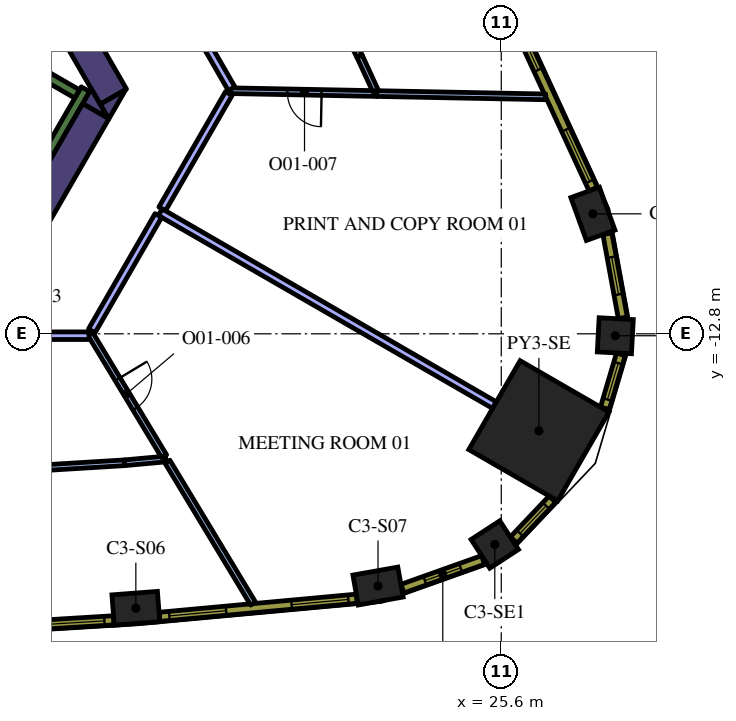
"""IFC4 building model, lengths in metres.
Left out: names, types, materials, properties, quantities, classifications, styles, units other than length and angle.
Written with IfcOpenShell. Run it as: python <this file> out.ifc"""

import sys

from ifc_helpers import new_model, si_unit, direction, frame, frame_2d, origin, origin_2d, place, context, subcontext, project, spatial, polyline, rectangle, outline, extrude, element, fill, save


model = new_model("IFC4")
c1 = context("Model", 3, precision=1e-05, world=origin(), true_north=direction((0.0, 1.0)))
c2 = subcontext(c1, "Body", "Model", "MODEL_VIEW")
j1 = project(units=[si_unit("LENGTHUNIT", "METRE"), si_unit("PLANEANGLEUNIT", "RADIAN")], contexts=[c1])
p1 = place(None, origin())
s1 = spatial("IfcSite", under=j1, at=p1, CompositionType="ELEMENT")
p2 = place(p1, origin())
s2 = spatial("IfcBuilding", under=s1, at=p2, CompositionType="ELEMENT")
p3 = place(p2, frame((0.0, 0.0, 150.0)))
s3 = spatial("IfcBuildingStorey", under=s2, at=p3, CompositionType="ELEMENT", Elevation=150.0)
p4 = place(p3, frame((26.591, -15.352, 0.0), z_axis=(0.0, 0.0, 1.0), x_axis=(0.866025403784, -0.5, 0.0)))
e1 = element("IfcColumn", 1, at=p4, inside=s3, PredefinedType="COLUMN", context=c2, shape_type="SweptSolid", body=[
    extrude(rectangle(XDim=2.7, YDim=2.7, at=origin_2d()), origin(), (0.0, 0.0, 1.0), 4.2),
])
for number, where, z_axis, x_axis in (
    (2, (15.985, -20.022, 0.0), (0.0, 0.0, 1.0), (0.997, 0.076, 0.0)),
    (3, (22.357, -19.437, 0.0), (0.0, 0.0, 1.0), (0.985, 0.175, 0.0)),
):
    element("IfcColumn", number, at=place(p3, frame(where, z_axis=z_axis, x_axis=x_axis)), inside=s3, PredefinedType="COLUMN", context=c2, shape_type="SweptSolid", body=[
        extrude(rectangle(XDim=1.2, YDim=0.8, at=origin_2d()), origin(), (0.0, 0.0, 1.0), 4.2),
    ])
for number, where, z_axis, x_axis in (
    (4, (25.43, -18.344, 0.0), (0.0, 0.0, 1.0), (0.838, 0.546, 0.0)),
    (5, (28.601, -12.851, 0.0), (0.0, 0.0, 1.0), (0.053, 0.999, 0.0)),
):
    element("IfcColumn", number, at=place(p3, frame(where, z_axis=z_axis, x_axis=x_axis)), inside=s3, PredefinedType="COLUMN", context=c2, shape_type="SweptSolid", body=[
        extrude(rectangle(XDim=0.9, YDim=0.9, at=origin_2d()), origin(), (0.0, 0.0, 1.0), 4.2),
    ])
p5 = place(p3, frame((28.012, -9.644, 0.0), z_axis=(0.0, 0.0, 1.0), x_axis=(-0.340743851601, 0.940156171918, 0.0)))
e6 = element("IfcColumn", 6, at=p5, inside=s3, PredefinedType="COLUMN", context=c2, shape_type="SweptSolid", body=[
    extrude(rectangle(XDim=1.2, YDim=0.8, at=origin_2d()), origin(), (0.0, 0.0, 1.0), 4.2),
])
p6 = place(p3, frame((9.129, 4.289, 0.0), z_axis=(0.0, 0.0, 1.0), x_axis=(0.499995742806, -0.866027861663, 0.0)))
e7 = element("IfcWall", 7, at=p6, inside=s3, PredefinedType="SOLIDWALL", context=c2, shape_type="SweptSolid", body=[
    extrude(rectangle(XDim=12.527, YDim=0.8, at=frame_2d((6.264, 0.0))), origin(), (0.0, 0.0, 1.0), 4.2),
])
p7 = place(p3, origin())
e8 = element("IfcWall", 8, at=p7, inside=s3, PredefinedType="SOLIDWALL", context=c2, shape_type="SweptSolid", body=[
    extrude(outline(polyline([(15.271, -7.15), (15.047, -6.762), (15.719, -6.374), (15.271, -7.15)])), origin(), (0.0, 0.0, 1.0), 4.2),
])
p8 = place(p3, frame((13.018, -10.252, 0.0), z_axis=(0.0, 0.0, 1.0), x_axis=(0.499984020225, 0.866034629516, 0.0)))
e9 = element("IfcWall", 9, at=p8, inside=s3, PredefinedType="SOLIDWALL", context=c2, shape_type="SweptSolid", body=[
    extrude(rectangle(XDim=3.824, YDim=0.8, at=frame_2d((1.912, 0.0))), origin(), (0.0, 0.0, 1.0), 4.2),
])
e10 = element("IfcWall", 10, at=p7, inside=s3, PredefinedType="SOLIDWALL", context=c2, shape_type="SweptSolid", body=[
    extrude(outline(polyline([(14.809, -6.35), (15.257, -7.126), (14.585, -6.738), (14.809, -6.35)])), origin(), (0.0, 0.0, 1.0), 4.2),
])
p9 = place(p3, frame((12.84, -9.511, 0.0), z_axis=(0.0, 0.0, 1.0), x_axis=(0.499997733992, 0.866026712061, 0.0)))
e11 = element("IfcWall", 11, at=p9, inside=s3, PredefinedType="SOLIDWALL", context=c2, shape_type="SweptSolid", body=[
    extrude(rectangle(XDim=3.634, YDim=0.25, at=frame_2d((1.817, 0.0))), origin(), (0.0, 0.0, 1.0), 4.2),
])
p10 = place(p3, frame((8.334, -2.964, 0.0), z_axis=(0.0, 0.0, 1.0), x_axis=(0.866016039709, -0.500016218704, 0.0)))
e12 = element("IfcWall", 12, at=p10, inside=s3, PredefinedType="SOLIDWALL", context=c2, shape_type="SweptSolid", body=[
    extrude(rectangle(XDim=7.05, YDim=0.25, at=frame_2d((3.525, 0.0))), origin(), (0.0, 0.0, 1.0), 4.2),
])
p11 = place(p3, frame((15.692, -16.193, 0.0), z_axis=(0.0, 0.0, 1.0), x_axis=(-0.998137075468, -0.061011298754, 0.0)))
e13 = element("IfcWall", 13, at=p11, inside=s3, PredefinedType="PARTITIONING", context=c2, shape_type="SweptSolid", body=[
    extrude(rectangle(XDim=6.282, YDim=0.15, at=frame_2d((3.141, 0.0))), origin(), (0.0, 0.0, 1.0), 3.15),
])
p12 = place(p11, frame((2.683, 0.0, 0.0)))
e14 = element("IfcOpeningElement", 14, at=p12, cuts=e13, PredefinedType="OPENING", context=c2, shape_type="SweptSolid", body=[
    extrude(rectangle(XDim=0.9, YDim=2.1, at=frame_2d((0.45, 1.05))), frame((0.0, 0.085, 0.0), z_axis=(0.0, -1.0, 0.0), x_axis=(1.0, 0.0, 0.0)), (0.0, 0.0, 1.0), 0.17),
])
p13 = place(p3, frame((15.692, -16.193, 0.0), z_axis=(0.0, 0.0, 1.0), x_axis=(0.995822859979, 0.091306251389, 0.0)))
e15 = element("IfcWall", 15, at=p13, inside=s3, PredefinedType="PARTITIONING", context=c2, shape_type="SweptSolid", body=[
    extrude(rectangle(XDim=1.086, YDim=0.15, at=frame_2d((0.543, 0.0))), origin(), (0.0, 0.0, 1.0), 3.15),
])
p14 = place(p3, frame((16.816, -16.165, 0.0), z_axis=(0.0, 0.0, 1.0), x_axis=(0.516814925326, -0.85609715159, 0.0)))
e16 = element("IfcWall", 16, at=p14, inside=s3, PredefinedType="PARTITIONING", context=c2, shape_type="SweptSolid", body=[
    extrude(rectangle(XDim=4.362, YDim=0.15, at=frame_2d((2.181, 0.0))), origin(), (0.0, 0.0, 1.0), 3.15),
])
p15 = place(p3, frame((14.782, -12.796, 0.0), z_axis=(0.0, 0.0, 1.0), x_axis=(0.516809076879, -0.856100682196, 0.0)))
e17 = element("IfcWall", 17, at=p15, inside=s3, PredefinedType="PARTITIONING", context=c2, shape_type="SweptSolid", body=[
    extrude(rectangle(XDim=3.768, YDim=0.15, at=frame_2d((1.884, 0.0))), origin(), (0.0, 0.0, 1.0), 3.15),
])
p16 = place(p15, frame((1.4, 0.0, 0.0)))
e18 = element("IfcOpeningElement", 18, at=p16, cuts=e17, PredefinedType="OPENING", context=c2, shape_type="SweptSolid", body=[
    extrude(rectangle(XDim=0.9, YDim=2.1, at=frame_2d((0.45, 1.05))), frame((0.0, 0.085, 0.0), z_axis=(0.0, -1.0, 0.0), x_axis=(1.0, 0.0, 0.0)), (0.0, 0.0, 1.0), 0.17),
])
p17 = place(p3, frame((5.03, -12.85, 0.0), z_axis=(0.0, 0.0, 1.0), x_axis=(1.0, 0.0, 0.0)))
e19 = element("IfcWall", 19, at=p17, inside=s3, PredefinedType="PARTITIONING", context=c2, shape_type="SweptSolid", body=[
    extrude(rectangle(XDim=9.721, YDim=0.2, at=frame_2d((4.861, 0.0))), origin(), (0.0, 0.0, 1.0), 3.15),
])
p18 = place(p3, frame((16.628, -9.6, 0.0), z_axis=(0.0, 0.0, 1.0), x_axis=(0.866031435434, -0.499989552732, 0.0)))
e20 = element("IfcWall", 20, at=p18, inside=s3, PredefinedType="PARTITIONING", context=c2, shape_type="SweptSolid", body=[
    extrude(rectangle(XDim=10.154, YDim=0.2, at=frame_2d((5.077, 0.0))), origin(), (0.0, 0.0, 1.0), 3.15),
])
p19 = place(p3, frame((14.825, -12.722, 0.0), z_axis=(0.0, 0.0, 1.0), x_axis=(0.499981686864, 0.86603597662, 0.0)))
e21 = element("IfcWall", 21, at=p19, inside=s3, PredefinedType="PARTITIONING", context=c2, shape_type="SweptSolid", body=[
    extrude(rectangle(XDim=3.506, YDim=0.2, at=frame_2d((1.753, 0.0))), origin(), (0.0, 0.0, 1.0), 3.15),
])
p20 = place(p3, frame((22.32, -6.479, 0.0), z_axis=(0.0, 0.0, 1.0), x_axis=(0.999809252738, -0.019530953357, 0.0)))
e22 = element("IfcWall", 22, at=p20, inside=s3, PredefinedType="PARTITIONING", context=c2, shape_type="SweptSolid", body=[
    extrude(rectangle(XDim=4.45, YDim=0.15, at=frame_2d((2.225, 0.0))), origin(), (0.0, 0.0, 1.0), 3.15),
])
p21 = place(p3, frame((22.328, -6.479, 0.0), z_axis=(0.0, 0.0, 1.0), x_axis=(-0.999809811932, 0.019502306655, 0.0)))
e23 = element("IfcWall", 23, at=p21, inside=s3, PredefinedType="PARTITIONING", context=c2, shape_type="SweptSolid", body=[
    extrude(rectangle(XDim=3.856, YDim=0.15, at=frame_2d((1.928, 0.0))), origin(), (0.0, 0.0, 1.0), 3.15),
])
p22 = place(p21, frame((1.456, 0.0, 0.0)))
e24 = element("IfcOpeningElement", 24, at=p22, cuts=e23, PredefinedType="OPENING", context=c2, shape_type="SweptSolid", body=[
    extrude(rectangle(XDim=0.9, YDim=2.1, at=frame_2d((0.45, 1.05))), frame((0.0, 0.085, 0.0), z_axis=(0.0, -1.0, 0.0), x_axis=(1.0, 0.0, 0.0)), (0.0, 0.0, 1.0), 0.17),
])
p23 = place(p3, frame((16.678, -9.513, 0.0), z_axis=(0.0, 0.0, 1.0), x_axis=(0.500011844827, 0.866018565062, 0.0)))
e25 = element("IfcWall", 25, at=p23, inside=s3, PredefinedType="PARTITIONING", context=c2, shape_type="SweptSolid", body=[
    extrude(rectangle(XDim=3.505, YDim=0.2, at=frame_2d((1.753, 0.0))), origin(), (0.0, 0.0, 1.0), 3.15),
])
p24 = place(p3, frame((22.289, -6.403, 0.0), z_axis=(0.0, 0.0, 1.0), x_axis=(-0.41893460807, 0.908016406328, 0.0)))
e26 = element("IfcWall", 26, at=p24, inside=s3, PredefinedType="PARTITIONING", context=c2, shape_type="SweptSolid", body=[
    extrude(rectangle(XDim=1.002, YDim=0.15, at=frame_2d((0.501, 0.0))), origin(), (0.0, 0.0, 1.0), 3.15),
])
p25 = place(p3, frame((19.066, 0.129, 0.0), z_axis=(0.0, 0.0, 1.0), x_axis=(0.446202922071, -0.89493181435, 0.0)))
e27 = element("IfcWall", 27, at=p25, inside=s3, PredefinedType="PARTITIONING", context=c2, shape_type="SweptSolid", body=[
    extrude(rectangle(XDim=6.282, YDim=0.15, at=frame_2d((3.141, 0.0))), origin(), (0.0, 0.0, 1.0), 3.15),
])
p26 = place(p25, frame((2.683, 0.0, 0.0)))
e28 = element("IfcOpeningElement", 28, at=p26, cuts=e27, PredefinedType="OPENING", context=c2, shape_type="SweptSolid", body=[
    extrude(rectangle(XDim=0.9, YDim=2.1, at=frame_2d((0.45, 1.05))), frame((0.0, 0.085, 0.0), z_axis=(0.0, -1.0, 0.0), x_axis=(1.0, 0.0, 0.0)), (0.0, 0.0, 1.0), 0.17),
])
p27 = place(p3, frame((18.504, -6.35, 0.0), z_axis=(0.0, 0.0, 1.0), x_axis=(-0.499995029582, 0.866028273438, 0.0)))
e29 = element("IfcWall", 29, at=p27, inside=s3, PredefinedType="PARTITIONING", context=c2, shape_type="SweptSolid", body=[
    extrude(rectangle(XDim=9.717, YDim=0.2, at=frame_2d((4.859, 0.0))), origin(), (0.0, 0.0, 1.0), 3.15),
])
p28 = place(p3, frame((10.211, -20.656, 0.0), z_axis=(0.0, 0.0, 1.0), x_axis=(0.998135294646, 0.061040425794, 0.0)))
e30 = element("IfcWall", 30, at=p28, inside=s3, PredefinedType="SOLIDWALL", context=c2, shape_type="SweptSolid", body=[
    extrude(rectangle(XDim=5.204, YDim=0.24, at=frame_2d((2.602, 0.0))), origin(), (0.0, 0.0, 1.0), 3.95),
])
p29 = place(p28, frame((0.248, 0.0, 0.9)))
e31 = element("IfcOpeningElement", 31, at=p29, cuts=e30, PredefinedType="OPENING", context=c2, shape_type="SweptSolid", body=[
    extrude(rectangle(XDim=1.5, YDim=2.55, at=frame_2d((0.75, 1.275))), frame((0.0, 0.13, 0.0), z_axis=(0.0, -1.0, 0.0), x_axis=(1.0, 0.0, 0.0)), (0.0, 0.0, 1.0), 0.26),
])
p30 = place(p28, frame((3.455, 0.0, 0.9)))
e32 = element("IfcOpeningElement", 32, at=p30, cuts=e30, PredefinedType="OPENING", context=c2, shape_type="SweptSolid", body=[
    extrude(rectangle(XDim=1.5, YDim=2.55, at=frame_2d((0.75, 1.275))), frame((0.0, 0.13, 0.0), z_axis=(0.0, -1.0, 0.0), x_axis=(1.0, 0.0, 0.0)), (0.0, 0.0, 1.0), 0.26),
])
p31 = place(p3, frame((16.606, -20.247, 0.0), z_axis=(0.0, 0.0, 1.0), x_axis=(0.995808712151, 0.091460422067, 0.0)))
e33 = element("IfcWall", 33, at=p31, inside=s3, PredefinedType="SOLIDWALL", context=c2, shape_type="SweptSolid", body=[
    extrude(rectangle(XDim=5.213, YDim=0.24, at=frame_2d((2.606, 0.0))), origin(), (0.0, 0.0, 1.0), 3.95),
])
p32 = place(p31, frame((0.261, 0.0, 0.9)))
e34 = element("IfcOpeningElement", 34, at=p32, cuts=e33, PredefinedType="OPENING", context=c2, shape_type="SweptSolid", body=[
    extrude(rectangle(XDim=1.5, YDim=2.55, at=frame_2d((0.75, 1.275))), frame((0.0, 0.13, 0.0), z_axis=(0.0, -1.0, 0.0), x_axis=(1.0, 0.0, 0.0)), (0.0, 0.0, 1.0), 0.26),
])
p33 = place(p31, frame((3.492, 0.0, 0.9)))
e35 = element("IfcOpeningElement", 35, at=p33, cuts=e33, PredefinedType="OPENING", context=c2, shape_type="SweptSolid", body=[
    extrude(rectangle(XDim=1.5, YDim=2.55, at=frame_2d((0.75, 1.275))), frame((0.0, 0.13, 0.0), z_axis=(0.0, -1.0, 0.0), x_axis=(1.0, 0.0, 0.0)), (0.0, 0.0, 1.0), 0.26),
])
p34 = place(p3, frame((23.001, -19.505, 0.0), z_axis=(0.0, 0.0, 1.0), x_axis=(0.942099727267, 0.335332825539, 0.0)))
e36 = element("IfcWall", 36, at=p34, inside=s3, PredefinedType="SOLIDWALL", context=c2, shape_type="SweptSolid", body=[
    extrude(rectangle(XDim=2.25, YDim=0.24, at=frame_2d((1.125, 0.0))), origin(), (0.0, 0.0, 1.0), 3.95),
])
p35 = place(p34, frame((0.625, 0.0, 0.9)))
e37 = element("IfcOpeningElement", 37, at=p35, cuts=e36, PredefinedType="OPENING", context=c2, shape_type="SweptSolid", body=[
    extrude(rectangle(XDim=1.0, YDim=2.55, at=frame_2d((0.5, 1.275))), frame((0.0, 0.13, 0.0), z_axis=(0.0, -1.0, 0.0), x_axis=(1.0, 0.0, 0.0)), (0.0, 0.0, 1.0), 0.26),
])
p36 = place(p3, frame((25.927, -18.226, 0.0), z_axis=(0.0, 0.0, 1.0), x_axis=(0.687986858937, 0.725723144133, 0.0)))
e38 = element("IfcWall", 38, at=p36, inside=s3, PredefinedType="SOLIDWALL", context=c2, shape_type="SweptSolid", body=[
    extrude(rectangle(XDim=1.481, YDim=0.24, at=frame_2d((0.741, 0.0))), origin(), (0.0, 0.0, 1.0), 3.95),
])
p37 = place(p36, frame((0.241, 0.0, 0.9)))
e39 = element("IfcOpeningElement", 39, at=p37, cuts=e38, PredefinedType="OPENING", context=c2, shape_type="SweptSolid", body=[
    extrude(rectangle(XDim=1.0, YDim=2.55, at=frame_2d((0.5, 1.275))), frame((0.0, 0.13, 0.0), z_axis=(0.0, -1.0, 0.0), x_axis=(1.0, 0.0, 0.0)), (0.0, 0.0, 1.0), 0.26),
])
p38 = place(p3, frame((28.326, -14.76, 0.0), z_axis=(0.0, 0.0, 1.0), x_axis=(0.284413721403, 0.958701640281, 0.0)))
e40 = element("IfcWall", 40, at=p38, inside=s3, PredefinedType="SOLIDWALL", context=c2, shape_type="SweptSolid", body=[
    extrude(rectangle(XDim=1.482, YDim=0.24, at=frame_2d((0.741, 0.0))), origin(), (0.0, 0.0, 1.0), 3.95),
])
p39 = place(p38, frame((0.241, 0.0, 0.9)))
e41 = element("IfcOpeningElement", 41, at=p39, cuts=e40, PredefinedType="OPENING", context=c2, shape_type="SweptSolid", body=[
    extrude(rectangle(XDim=1.0, YDim=2.55, at=frame_2d((0.5, 1.275))), frame((0.0, 0.13, 0.0), z_axis=(0.0, -1.0, 0.0), x_axis=(1.0, 0.0, 0.0)), (0.0, 0.0, 1.0), 0.26),
])
p40 = place(p3, frame((28.799, -12.38, 0.0), z_axis=(0.0, 0.0, 1.0), x_axis=(-0.180737189259, 0.983531427265, 0.0)))
e42 = element("IfcWall", 42, at=p40, inside=s3, PredefinedType="SOLIDWALL", context=c2, shape_type="SweptSolid", body=[
    extrude(rectangle(XDim=2.25, YDim=0.24, at=frame_2d((1.125, 0.0))), origin(), (0.0, 0.0, 1.0), 3.95),
])
p41 = place(p40, frame((0.625, 0.0, 0.9)))
e43 = element("IfcOpeningElement", 43, at=p41, cuts=e42, PredefinedType="OPENING", context=c2, shape_type="SweptSolid", body=[
    extrude(rectangle(XDim=1.0, YDim=2.55, at=frame_2d((0.5, 1.275))), frame((0.0, 0.13, 0.0), z_axis=(0.0, -1.0, 0.0), x_axis=(1.0, 0.0, 0.0)), (0.0, 0.0, 1.0), 0.26),
])
p42 = place(p3, frame((28.02, -8.992, 0.0), z_axis=(0.0, 0.0, 1.0), x_axis=(-0.418722559465, 0.908114209885, 0.0)))
e44 = element("IfcWall", 44, at=p42, inside=s3, PredefinedType="SOLIDWALL", context=c2, shape_type="SweptSolid", body=[
    extrude(rectangle(XDim=5.213, YDim=0.24, at=frame_2d((2.606, 0.0))), origin(), (0.0, 0.0, 1.0), 3.95),
])
p43 = place(p42, frame((0.221, 0.0, 0.9)))
e45 = element("IfcOpeningElement", 45, at=p43, cuts=e44, PredefinedType="OPENING", context=c2, shape_type="SweptSolid", body=[
    extrude(rectangle(XDim=1.5, YDim=2.55, at=frame_2d((0.75, 1.275))), frame((0.0, 0.13, 0.0), z_axis=(0.0, -1.0, 0.0), x_axis=(1.0, 0.0, 0.0)), (0.0, 0.0, 1.0), 0.26),
])
p44 = place(p42, frame((3.452, 0.0, 0.9)))
e46 = element("IfcOpeningElement", 46, at=p44, cuts=e44, PredefinedType="OPENING", context=c2, shape_type="SweptSolid", body=[
    extrude(rectangle(XDim=1.5, YDim=2.55, at=frame_2d((0.75, 1.275))), frame((0.0, 0.13, 0.0), z_axis=(0.0, -1.0, 0.0), x_axis=(1.0, 0.0, 0.0)), (0.0, 0.0, 1.0), 0.26),
])
p45 = place(p16, origin())
e47 = element("IfcDoor", 47, at=p45, inside=s3, OperationType="SINGLE_SWING_LEFT", PredefinedType="DOOR", context=c2, shape_type="SweptSolid", body=[
    extrude(rectangle(XDim=0.9, YDim=2.1, at=frame_2d((0.45, 1.05))), frame((0.0, 0.025, 0.0), z_axis=(0.0, -1.0, 0.0), x_axis=(1.0, 0.0, 0.0)), (0.0, 0.0, 1.0), 0.05),
])
fill(e18, e47)
p46 = place(p22, origin())
e48 = element("IfcDoor", 48, at=p46, inside=s3, OperationType="SINGLE_SWING_LEFT", PredefinedType="DOOR", context=c2, shape_type="SweptSolid", body=[
    extrude(rectangle(XDim=0.9, YDim=2.1, at=frame_2d((0.45, 1.05))), frame((0.0, 0.025, 0.0), z_axis=(0.0, -1.0, 0.0), x_axis=(1.0, 0.0, 0.0)), (0.0, 0.0, 1.0), 0.05),
])
fill(e24, e48)
p47 = place(p30, origin())
e49 = element("IfcWindow", 49, at=p47, inside=s3, PartitioningType="SINGLE_PANEL", PredefinedType="WINDOW", context=c2, shape_type="SweptSolid", body=[
    extrude(rectangle(XDim=1.5, YDim=2.55, at=frame_2d((0.75, 1.275))), frame((0.0, 0.04, 0.0), z_axis=(0.0, -1.0, 0.0), x_axis=(1.0, 0.0, 0.0)), (0.0, 0.0, 1.0), 0.06),
])
fill(e32, e49)
p48 = place(p32, origin())
e50 = element("IfcWindow", 50, at=p48, inside=s3, PartitioningType="SINGLE_PANEL", PredefinedType="WINDOW", context=c2, shape_type="SweptSolid", body=[
    extrude(rectangle(XDim=1.5, YDim=2.55, at=frame_2d((0.75, 1.275))), frame((0.0, 0.04, 0.0), z_axis=(0.0, -1.0, 0.0), x_axis=(1.0, 0.0, 0.0)), (0.0, 0.0, 1.0), 0.06),
])
fill(e34, e50)
p49 = place(p33, origin())
e51 = element("IfcWindow", 51, at=p49, inside=s3, PartitioningType="SINGLE_PANEL", PredefinedType="WINDOW", context=c2, shape_type="SweptSolid", body=[
    extrude(rectangle(XDim=1.5, YDim=2.55, at=frame_2d((0.75, 1.275))), frame((0.0, 0.04, 0.0), z_axis=(0.0, -1.0, 0.0), x_axis=(1.0, 0.0, 0.0)), (0.0, 0.0, 1.0), 0.06),
])
fill(e35, e51)
p50 = place(p35, origin())
e52 = element("IfcWindow", 52, at=p50, inside=s3, PartitioningType="SINGLE_PANEL", PredefinedType="WINDOW", context=c2, shape_type="SweptSolid", body=[
    extrude(rectangle(XDim=1.0, YDim=2.55, at=frame_2d((0.5, 1.275))), frame((0.0, 0.04, 0.0), z_axis=(0.0, -1.0, 0.0), x_axis=(1.0, 0.0, 0.0)), (0.0, 0.0, 1.0), 0.06),
])
fill(e37, e52)
p51 = place(p37, origin())
e53 = element("IfcWindow", 53, at=p51, inside=s3, PartitioningType="SINGLE_PANEL", PredefinedType="WINDOW", context=c2, shape_type="SweptSolid", body=[
    extrude(rectangle(XDim=1.0, YDim=2.55, at=frame_2d((0.5, 1.275))), frame((0.0, 0.04, 0.0), z_axis=(0.0, -1.0, 0.0), x_axis=(1.0, 0.0, 0.0)), (0.0, 0.0, 1.0), 0.06),
])
fill(e39, e53)
p52 = place(p39, origin())
e54 = element("IfcWindow", 54, at=p52, inside=s3, PartitioningType="SINGLE_PANEL", PredefinedType="WINDOW", context=c2, shape_type="SweptSolid", body=[
    extrude(rectangle(XDim=1.0, YDim=2.55, at=frame_2d((0.5, 1.275))), frame((0.0, 0.04, 0.0), z_axis=(0.0, -1.0, 0.0), x_axis=(1.0, 0.0, 0.0)), (0.0, 0.0, 1.0), 0.06),
])
fill(e41, e54)
p53 = place(p41, origin())
e55 = element("IfcWindow", 55, at=p53, inside=s3, PartitioningType="SINGLE_PANEL", PredefinedType="WINDOW", context=c2, shape_type="SweptSolid", body=[
    extrude(rectangle(XDim=1.0, YDim=2.55, at=frame_2d((0.5, 1.275))), frame((0.0, 0.04, 0.0), z_axis=(0.0, -1.0, 0.0), x_axis=(1.0, 0.0, 0.0)), (0.0, 0.0, 1.0), 0.06),
])
fill(e43, e55)
p54 = place(p43, origin())
e56 = element("IfcWindow", 56, at=p54, inside=s3, PartitioningType="SINGLE_PANEL", PredefinedType="WINDOW", context=c2, shape_type="SweptSolid", body=[
    extrude(rectangle(XDim=1.5, YDim=2.55, at=frame_2d((0.75, 1.275))), frame((0.0, 0.04, 0.0), z_axis=(0.0, -1.0, 0.0), x_axis=(1.0, 0.0, 0.0)), (0.0, 0.0, 1.0), 0.06),
])
fill(e45, e56)
p55 = place(p44, origin())
e57 = element("IfcWindow", 57, at=p55, inside=s3, PartitioningType="SINGLE_PANEL", PredefinedType="WINDOW", context=c2, shape_type="SweptSolid", body=[
    extrude(rectangle(XDim=1.5, YDim=2.55, at=frame_2d((0.75, 1.275))), frame((0.0, 0.04, 0.0), z_axis=(0.0, -1.0, 0.0), x_axis=(1.0, 0.0, 0.0)), (0.0, 0.0, 1.0), 0.06),
])
fill(e46, e57)
save(model, sys.argv[1])
